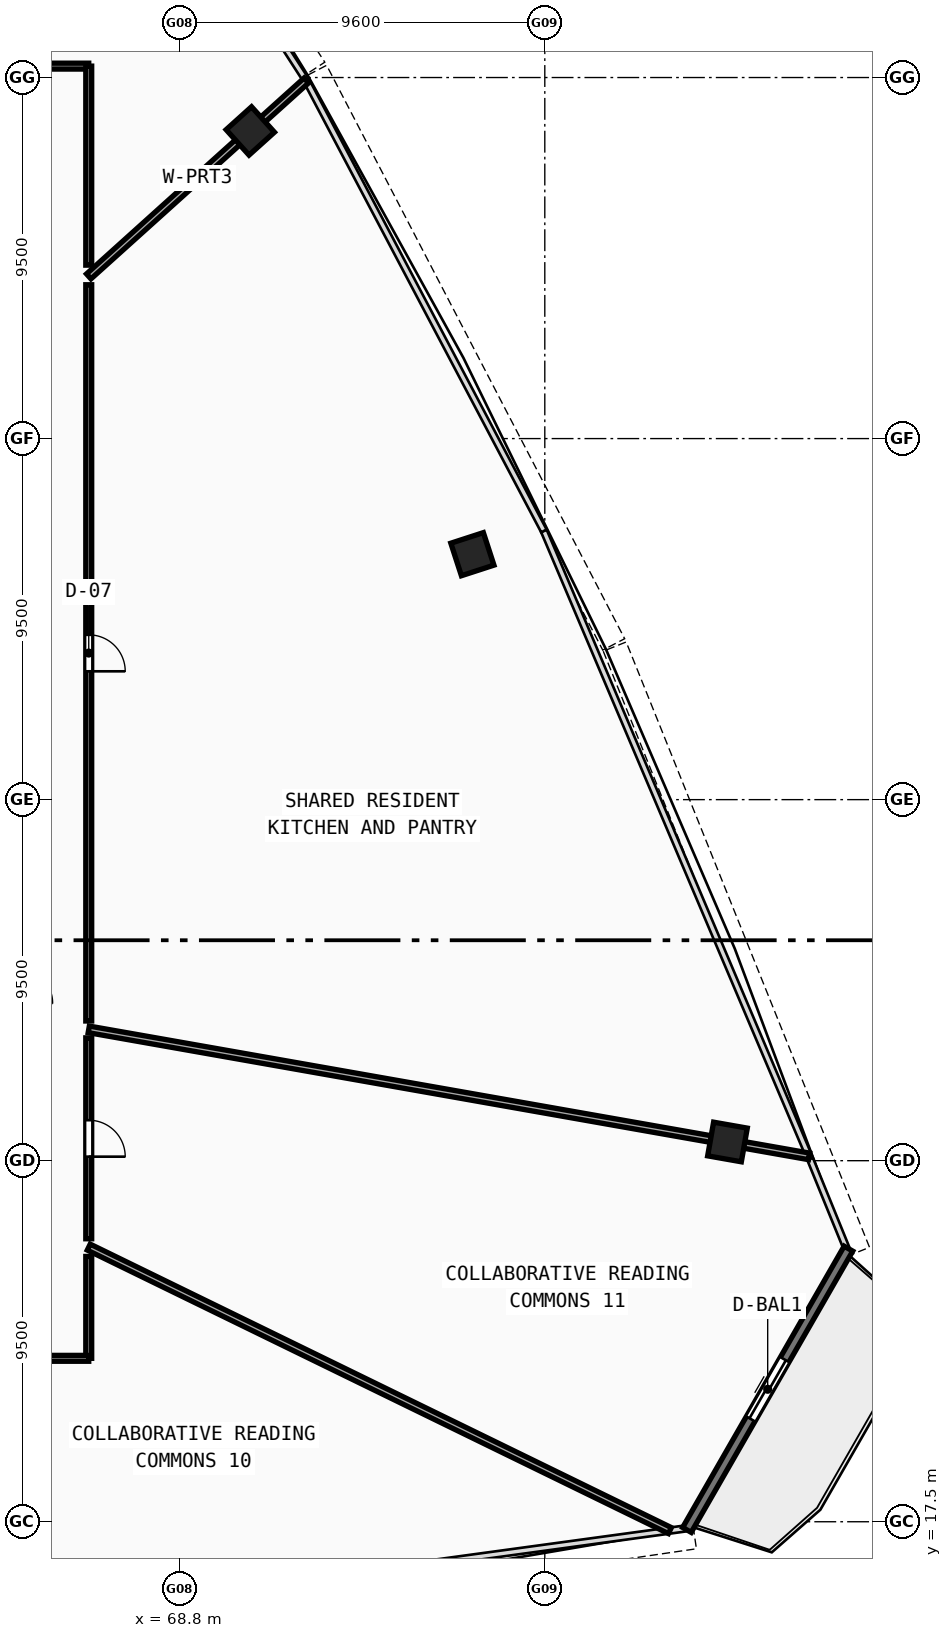
"""IFC4 building model, lengths in metres.
Left out: names, types, materials, properties, quantities, classifications, styles, units other than length and angle.
Written with IfcOpenShell. Run it as: python <this file> out.ifc"""

import sys

from ifc_helpers import new_model, si_unit, direction, frame, frame_2d, origin, origin_with_axes, origin_2d, place, context, subcontext, project, spatial, rectangle, hollow_rectangle, extrude, source, transform, mapped, element, fill, save


model = new_model("IFC4")
c1 = context("Model", 3, precision=1e-05, world=origin(), true_north=direction((0.0, 1.0)))
c2 = subcontext(c1, "Body", "Model", "MODEL_VIEW")
j1 = project(units=[si_unit("LENGTHUNIT", "METRE"), si_unit("PLANEANGLEUNIT", "RADIAN")], contexts=[c1])
p1 = place(None, origin())
s1 = spatial("IfcSite", under=j1, at=p1, CompositionType="ELEMENT")
p2 = place(p1, origin())
s2 = spatial("IfcBuilding", under=s1, at=p2, CompositionType="ELEMENT")
p3 = place(p2, frame((0.0, 0.0, 199.96)))
s3 = spatial("IfcBuildingStorey", under=s2, at=p3, CompositionType="ELEMENT", Elevation=199.96)
m1 = source(origin(), c2, "Body", "SweptSolid", [
    extrude(hollow_rectangle(XDim=0.9, YDim=0.9, WallThickness=0.036, at=origin_2d()), origin(), (0.0, 0.0, 1.0), 3.8),
])
for number, where, z_axis, x_axis in (
    (1, (83.207, 27.492, -0.26), (0.0, 0.0, 1.0), (0.174, 0.985, 0.0)),
    (2, (76.495, 42.958, -0.26), (0.0, 0.0, 1.0), (-0.309, 0.951, 0.0)),
    (3, (70.651, 54.095, -0.26), (0.0, 0.0, 1.0), (-0.669, 0.743, 0.0)),
):
    element("IfcColumn", number, at=place(p3, frame(where, z_axis=z_axis, x_axis=x_axis)), inside=s3, PredefinedType="COLUMN", context=c2, shape_type="MappedRepresentation", body=[
        mapped(m1, transform((0.0, 0.0, 0.0), scale=1.0)),
    ])
p4 = place(p3, frame((82.14, 17.285, 0.0), z_axis=(0.0, 0.0, 1.0), x_axis=(0.497930869929, 0.867216725376, 0.0)))
e4 = element("IfcWall", 4, at=p4, inside=s3, PredefinedType="STANDARD", context=c2, shape_type="SweptSolid", body=[
    extrude(rectangle(XDim=8.534, YDim=0.26, at=frame_2d((4.267, 0.0))), origin(), (0.0, 0.0, 1.0), 3.54),
])
p5 = place(p4, frame((3.367, 0.0, 0.0)))
e5 = element("IfcOpeningElement", 5, at=p5, cuts=e4, PredefinedType="OPENING", context=c2, shape_type="SweptSolid", body=[
    extrude(rectangle(XDim=1.8, YDim=2.15, at=frame_2d((0.9, 1.075))), frame((0.0, 0.14, 0.0), z_axis=(0.0, -1.0, 0.0), x_axis=(1.0, 0.0, 0.0)), (0.0, 0.0, 1.0), 0.28),
])
p6 = place(p3, frame((66.4, 50.267, 0.0), z_axis=(0.0, 0.0, 1.0), x_axis=(0.743141257722, 0.669134568731, 0.0)))
e6 = element("IfcWall", 6, at=p6, inside=s3, PredefinedType="PARTITIONING", context=c2, shape_type="SweptSolid", body=[
    extrude(rectangle(XDim=7.703, YDim=0.175, at=frame_2d((3.852, 0.0))), origin(), (0.0, 0.0, 1.0), 2.89),
])
p7 = place(p3, frame((66.4, 24.726, 0.0), z_axis=(0.0, 0.0, 1.0), x_axis=(0.898797681505, -0.438363693435, 0.0)))
e7 = element("IfcWall", 7, at=p7, inside=s3, PredefinedType="PARTITIONING", context=c2, shape_type="SweptSolid", body=[
    extrude(rectangle(XDim=17.013, YDim=0.175, at=frame_2d((8.507, 0.0))), origin(), (0.0, 0.0, 1.0), 2.89),
])
p8 = place(p3, frame((66.4, 30.456, 0.0), z_axis=(0.0, 0.0, 1.0), x_axis=(0.984807685374, -0.173648561263, 0.0)))
e8 = element("IfcWall", 8, at=p8, inside=s3, PredefinedType="PARTITIONING", context=c2, shape_type="SweptSolid", body=[
    extrude(rectangle(XDim=19.246, YDim=0.175, at=frame_2d((9.623, 0.0))), origin(), (0.0, 0.0, 1.0), 2.89),
])
p9 = place(p3, frame((58.08, 55.8, 0.0), z_axis=(0.0, 0.0, 1.0), x_axis=(1.0, 0.0, 0.0)))
e9 = element("IfcWall", 9, at=p9, inside=s3, PredefinedType="PARTITIONING", context=c2, shape_type="SweptSolid", body=[
    extrude(rectangle(XDim=8.32, YDim=0.155, at=frame_2d((4.16, 0.0))), origin(), (0.0, 0.0, 1.0), 3.14),
])
p10 = place(p9, frame((3.809, 0.0, 0.0)))
e10 = element("IfcOpeningElement", 10, at=p10, cuts=e9, PredefinedType="OPENING", context=c2, shape_type="SweptSolid", body=[
    extrude(rectangle(XDim=0.92, YDim=2.1, at=frame_2d((0.46, 1.05))), frame((0.0, 0.087, 0.0), z_axis=(0.0, -1.0, 0.0), x_axis=(1.0, 0.0, 0.0)), (0.0, 0.0, 1.0), 0.175),
])
p11 = place(p3, frame((66.4, 55.8, 0.0), z_axis=(0.0, 0.0, 1.0), x_axis=(0.0, -1.0, 0.0)))
e11 = element("IfcWall", 11, at=p11, inside=s3, PredefinedType="PARTITIONING", context=c2, shape_type="SweptSolid", body=[
    extrude(rectangle(XDim=5.237, YDim=0.155, at=frame_2d((2.618, 0.0))), origin(), (0.0, 0.0, 1.0), 3.54),
])
p12 = place(p3, frame((66.4, 50.048, 0.0), z_axis=(0.0, 0.0, 1.0), x_axis=(0.0, -1.0, 0.0)))
e12 = element("IfcWall", 12, at=p12, inside=s3, PredefinedType="PARTITIONING", context=c2, shape_type="SweptSolid", body=[
    extrude(rectangle(XDim=19.372, YDim=0.155, at=frame_2d((9.686, 0.0))), origin(), (0.0, 0.0, 1.0), 2.89),
])
p13 = place(p12, frame((9.211, 0.0, 0.0)))
e13 = element("IfcOpeningElement", 13, at=p13, cuts=e12, PredefinedType="OPENING", context=c2, shape_type="SweptSolid", body=[
    extrude(rectangle(XDim=0.96, YDim=2.12, at=frame_2d((0.48, 1.06))), frame((0.0, 0.087, 0.0), z_axis=(0.0, -1.0, 0.0), x_axis=(1.0, 0.0, 0.0)), (0.0, 0.0, 1.0), 0.175),
])
p14 = place(p3, frame((66.4, 30.232, 0.0), z_axis=(0.0, 0.0, 1.0), x_axis=(0.0, -1.0, 0.0)))
e14 = element("IfcWall", 14, at=p14, inside=s3, PredefinedType="PARTITIONING", context=c2, shape_type="SweptSolid", body=[
    extrude(rectangle(XDim=5.287, YDim=0.155, at=frame_2d((2.643, 0.0))), origin(), (0.0, 0.0, 1.0), 3.14),
])
p15 = place(p14, frame((2.167, 0.0, 0.0)))
e15 = element("IfcOpeningElement", 15, at=p15, cuts=e14, PredefinedType="OPENING", context=c2, shape_type="SweptSolid", body=[
    extrude(rectangle(XDim=0.96, YDim=2.12, at=frame_2d((0.48, 1.06))), frame((0.0, 0.087, 0.0), z_axis=(0.0, -1.0, 0.0), x_axis=(1.0, 0.0, 0.0)), (0.0, 0.0, 1.0), 0.175),
])
p16 = place(p3, frame((66.4, 24.481, 0.0), z_axis=(0.0, 0.0, 1.0), x_axis=(0.0, -1.0, 0.0)))
e16 = element("IfcWall", 16, at=p16, inside=s3, PredefinedType="PARTITIONING", context=c2, shape_type="SweptSolid", body=[
    extrude(rectangle(XDim=2.681, YDim=0.155, at=frame_2d((1.34, 0.0))), origin(), (0.0, 0.0, 1.0), 3.14),
])
p17 = place(p3, frame((66.4, 21.8, 0.0), z_axis=(0.0, 0.0, 1.0), x_axis=(-1.0, 0.0, 0.0)))
e17 = element("IfcWall", 17, at=p17, inside=s3, PredefinedType="PARTITIONING", context=c2, shape_type="SweptSolid", body=[
    extrude(rectangle(XDim=8.127, YDim=0.155, at=frame_2d((4.064, 0.0))), origin(), (0.0, 0.0, 1.0), 3.14),
])
p18 = place(p17, frame((3.502, 0.0, 0.0)))
e18 = element("IfcOpeningElement", 18, at=p18, cuts=e17, PredefinedType="OPENING", context=c2, shape_type="SweptSolid", body=[
    extrude(rectangle(XDim=0.96, YDim=2.12, at=frame_2d((0.48, 1.06))), frame((0.0, 0.087, 0.0), z_axis=(0.0, -1.0, 0.0), x_axis=(1.0, 0.0, 0.0)), (0.0, 0.0, 1.0), 0.175),
])
m2 = source(origin(), c2, "Body", "SweptSolid", [
    extrude(rectangle(XDim=1.8, YDim=2.15, at=frame_2d((0.9, 1.075))), frame((0.0, 0.025, 0.0), z_axis=(0.0, -1.0, 0.0), x_axis=(1.0, 0.0, 0.0)), (0.0, 0.0, 1.0), 0.05),
])
p19 = place(p5, origin_with_axes())
e19 = element("IfcDoor", 19, at=p19, inside=s3, OperationType="DOUBLE_DOOR_SLIDING", PredefinedType="DOOR", context=c2, shape_type="MappedRepresentation", body=[
    mapped(m2, transform((0.0, 0.0, 0.0), scale=1.0)),
])
fill(e5, e19)
m3 = source(origin(), c2, "Body", "SweptSolid", [
    extrude(rectangle(XDim=0.96, YDim=2.12, at=frame_2d((0.48, 1.06))), frame((0.0, 0.025, 0.0), z_axis=(0.0, -1.0, 0.0), x_axis=(1.0, 0.0, 0.0)), (0.0, 0.0, 1.0), 0.05),
])
p20 = place(p13, origin_with_axes())
e20 = element("IfcDoor", 20, at=p20, inside=s3, OperationType="SINGLE_SWING_RIGHT", PredefinedType="DOOR", context=c2, shape_type="MappedRepresentation", body=[
    mapped(m3, transform((0.0, 0.0, 0.0), scale=1.0)),
])
fill(e13, e20)
p21 = place(p15, origin_with_axes())
e21 = element("IfcDoor", 21, at=p21, inside=s3, OperationType="SINGLE_SWING_RIGHT", PredefinedType="DOOR", context=c2, shape_type="MappedRepresentation", body=[
    mapped(m3, transform((0.0, 0.0, 0.0), scale=1.0)),
])
fill(e15, e21)
save(model, sys.argv[1])
